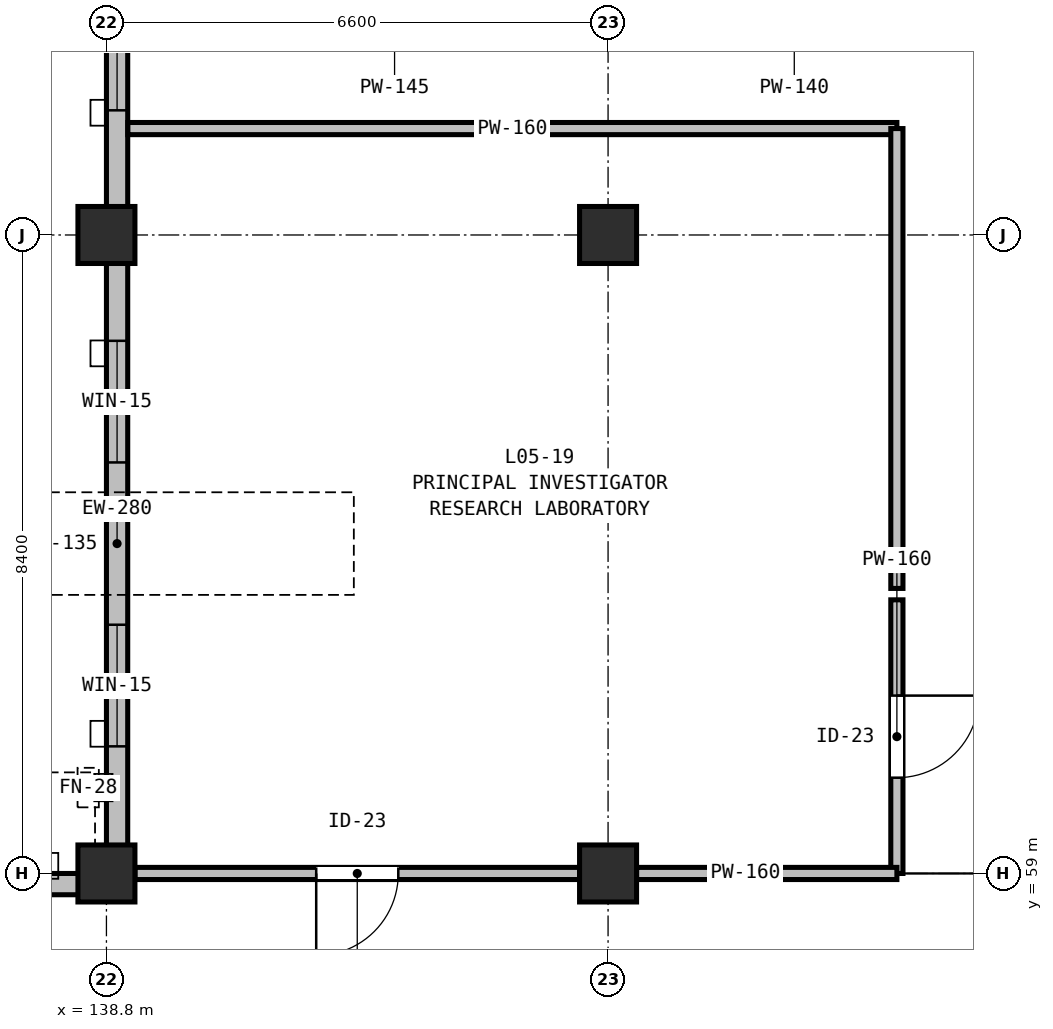
"""IFC4 building model, lengths in metres.
Left out: names, types, materials, properties, quantities, classifications, styles, units other than length and angle.
Written with IfcOpenShell. Run it as: python <this file> out.ifc"""

import sys

from ifc_helpers import new_model, si_unit, direction, frame, frame_2d, origin, origin_2d, place, context, subcontext, project, spatial, rectangle, extrude, element, fill, save


model = new_model("IFC4")
c1 = context("Model", 3, precision=1e-05, world=origin(), true_north=direction((0.0, 1.0)))
c2 = subcontext(c1, "Body", "Model", "MODEL_VIEW")
j1 = project(units=[si_unit("LENGTHUNIT", "METRE"), si_unit("PLANEANGLEUNIT", "RADIAN")], contexts=[c1])
p1 = place(None, origin())
s1 = spatial("IfcSite", under=j1, at=p1, CompositionType="ELEMENT")
p2 = place(p1, origin())
s2 = spatial("IfcBuilding", under=s1, at=p2, CompositionType="ELEMENT")
p3 = place(p2, frame((0.0, 0.0, 24.0)))
s3 = spatial("IfcBuildingStorey", under=s2, at=p3, CompositionType="ELEMENT", Elevation=24.0)
for number, where, z_axis, x_axis in (
    (1, (138.8, 59.0, 0.0), (0.0, 0.0, 1.0), (1.0, 0.0, 0.0)),
    (2, (138.8, 67.4, 0.0), (0.0, 0.0, 1.0), (1.0, 0.0, 0.0)),
    (3, (145.4, 59.0, 0.0), (0.0, 0.0, 1.0), (1.0, 0.0, 0.0)),
    (4, (145.4, 67.4, 0.0), (0.0, 0.0, 1.0), (1.0, 0.0, 0.0)),
):
    element("IfcColumn", number, at=place(p3, frame(where, z_axis=z_axis, x_axis=x_axis)), inside=s3, PredefinedType="COLUMN", context=c2, shape_type="SweptSolid", body=[
        extrude(rectangle(XDim=0.75, YDim=0.75, at=origin_2d()), origin(), (0.0, 0.0, 1.0), 4.5),
    ])
p4 = place(p3, frame((135.2, 58.86, 0.0), z_axis=(0.0, 0.0, 1.0), x_axis=(1.0, 0.0, 0.0)))
e5 = element("IfcWall", 5, at=p4, inside=s3, PredefinedType="STANDARD", context=c2, shape_type="SweptSolid", body=[
    extrude(rectangle(XDim=3.6, YDim=0.28, at=frame_2d((1.8, 0.0))), origin(), (0.0, 0.0, 1.0), 3.735),
])
p5 = place(p4, frame((1.1, 0.0, 0.9)))
e6 = element("IfcOpeningElement", 6, at=p5, cuts=e5, PredefinedType="OPENING", context=c2, shape_type="SweptSolid", body=[
    extrude(rectangle(XDim=1.4, YDim=1.55, at=frame_2d((0.7, 0.775))), frame((0.0, 0.15, 0.0), z_axis=(0.0, -1.0, 0.0), x_axis=(1.0, 0.0, 0.0)), (0.0, 0.0, 1.0), 0.3),
])
p6 = place(p3, frame((138.94, 59.28, 0.0), z_axis=(0.0, 0.0, 1.0), x_axis=(0.0, 1.0, 0.0)))
e7 = element("IfcWall", 7, at=p6, inside=s3, PredefinedType="STANDARD", context=c2, shape_type="SweptSolid", body=[
    extrude(rectangle(XDim=8.12, YDim=0.28, at=frame_2d((4.06, 0.0))), origin(), (0.0, 0.0, 1.0), 3.885),
])
p7 = place(p6, frame((1.392, 0.0, 0.9)))
e8 = element("IfcOpeningElement", 8, at=p7, cuts=e7, PredefinedType="OPENING", context=c2, shape_type="SweptSolid", body=[
    extrude(rectangle(XDim=1.6, YDim=1.6, at=frame_2d((0.8, 0.8))), frame((0.0, 0.15, 0.0), z_axis=(0.0, -1.0, 0.0), x_axis=(1.0, 0.0, 0.0)), (0.0, 0.0, 1.0), 0.3),
])
p8 = place(p6, frame((5.128, 0.0, 0.9)))
e9 = element("IfcOpeningElement", 9, at=p8, cuts=e7, PredefinedType="OPENING", context=c2, shape_type="SweptSolid", body=[
    extrude(rectangle(XDim=1.6, YDim=1.6, at=frame_2d((0.8, 0.8))), frame((0.0, 0.15, 0.0), z_axis=(0.0, -1.0, 0.0), x_axis=(1.0, 0.0, 0.0)), (0.0, 0.0, 1.0), 0.3),
])
p9 = place(p3, frame((138.94, 67.4, 0.0), z_axis=(0.0, 0.0, 1.0), x_axis=(0.0, 1.0, 0.0)))
e10 = element("IfcWall", 10, at=p9, inside=s3, PredefinedType="STANDARD", context=c2, shape_type="SweptSolid", body=[
    extrude(rectangle(XDim=8.4, YDim=0.28, at=frame_2d((4.2, 0.0))), origin(), (0.0, 0.0, 1.0), 3.885),
])
p10 = place(p9, frame((1.64, 0.0, 0.9)))
e11 = element("IfcOpeningElement", 11, at=p10, cuts=e10, PredefinedType="OPENING", context=c2, shape_type="SweptSolid", body=[
    extrude(rectangle(XDim=1.85, YDim=1.6, at=frame_2d((0.925, 0.8))), frame((0.0, 0.15, 0.0), z_axis=(0.0, -1.0, 0.0), x_axis=(1.0, 0.0, 0.0)), (0.0, 0.0, 1.0), 0.3),
])
p11 = place(p9, frame((5.207, 0.0, 0.9)))
e12 = element("IfcOpeningElement", 12, at=p11, cuts=e10, PredefinedType="OPENING", context=c2, shape_type="SweptSolid", body=[
    extrude(rectangle(XDim=1.85, YDim=1.6, at=frame_2d((0.925, 0.8))), frame((0.0, 0.15, 0.0), z_axis=(0.0, -1.0, 0.0), x_axis=(1.0, 0.0, 0.0)), (0.0, 0.0, 1.0), 0.3),
])
p12 = place(p3, frame((149.2, 62.6, 0.0), z_axis=(0.0, 0.0, 1.0), x_axis=(0.0, -1.0, 0.0)))
e13 = element("IfcWall", 13, at=p12, inside=s3, PredefinedType="PARTITIONING", context=c2, shape_type="SweptSolid", body=[
    extrude(rectangle(XDim=3.6, YDim=0.16, at=frame_2d((1.8, 0.0))), origin(), (0.0, 0.0, 1.0), 3.885),
])
p13 = place(p12, frame((1.26, 0.0, 0.0)))
e14 = element("IfcOpeningElement", 14, at=p13, cuts=e13, PredefinedType="OPENING", context=c2, shape_type="SweptSolid", body=[
    extrude(rectangle(XDim=1.08, YDim=2.14, at=frame_2d((0.54, 1.07))), frame((0.0, 0.09, 0.0), z_axis=(0.0, -1.0, 0.0), x_axis=(1.0, 0.0, 0.0)), (0.0, 0.0, 1.0), 0.18),
])
p14 = place(p3, frame((149.2, 59.0, 0.0), z_axis=(0.0, 0.0, 1.0), x_axis=(-1.0, 0.0, 0.0)))
e15 = element("IfcWall", 15, at=p14, inside=s3, PredefinedType="PARTITIONING", context=c2, shape_type="SweptSolid", body=[
    extrude(rectangle(XDim=3.425, YDim=0.16, at=frame_2d((1.712, 0.0))), origin(), (0.0, 0.0, 1.0), 3.885),
])
p15 = place(p3, frame((145.025, 59.0, 0.0), z_axis=(0.0, 0.0, 1.0), x_axis=(-1.0, 0.0, 0.0)))
e16 = element("IfcWall", 16, at=p15, inside=s3, PredefinedType="PARTITIONING", context=c2, shape_type="SweptSolid", body=[
    extrude(rectangle(XDim=5.85, YDim=0.16, at=frame_2d((2.925, 0.0))), origin(), (0.0, 0.0, 1.0), 3.885),
])
p16 = place(p15, frame((2.385, 0.0, 0.0)))
e17 = element("IfcOpeningElement", 17, at=p16, cuts=e16, PredefinedType="OPENING", context=c2, shape_type="SweptSolid", body=[
    extrude(rectangle(XDim=1.08, YDim=2.14, at=frame_2d((0.54, 1.07))), frame((0.0, 0.09, 0.0), z_axis=(0.0, -1.0, 0.0), x_axis=(1.0, 0.0, 0.0)), (0.0, 0.0, 1.0), 0.18),
])
p17 = place(p3, frame((139.082, 68.8, 0.0), z_axis=(0.0, 0.0, 1.0), x_axis=(1.0, 0.0, 0.0)))
e18 = element("IfcWall", 18, at=p17, inside=s3, PredefinedType="PARTITIONING", context=c2, shape_type="SweptSolid", body=[
    extrude(rectangle(XDim=10.118, YDim=0.16, at=frame_2d((5.059, 0.0))), origin(), (0.0, 0.0, 1.0), 3.735),
])
p18 = place(p3, frame((149.2, 68.8, 0.0), z_axis=(0.0, 0.0, 1.0), x_axis=(0.0, -1.0, 0.0)))
e19 = element("IfcWall", 19, at=p18, inside=s3, PredefinedType="PARTITIONING", context=c2, shape_type="SweptSolid", body=[
    extrude(rectangle(XDim=6.05, YDim=0.16, at=frame_2d((3.025, 0.0))), origin(), (0.0, 0.0, 1.0), 3.885),
])
p19 = place(p7, origin())
e20 = element("IfcWindow", 20, at=p19, inside=s3, PartitioningType="SINGLE_PANEL", PredefinedType="WINDOW", context=c2, shape_type="SweptSolid", body=[
    extrude(rectangle(XDim=1.6, YDim=1.6, at=frame_2d((0.8, 0.8))), frame((0.0, 0.03, 0.0), z_axis=(0.0, -1.0, 0.0), x_axis=(1.0, 0.0, 0.0)), (0.0, 0.0, 1.0), 0.06),
])
fill(e8, e20)
p20 = place(p8, origin())
e21 = element("IfcWindow", 21, at=p20, inside=s3, PartitioningType="SINGLE_PANEL", PredefinedType="WINDOW", context=c2, shape_type="SweptSolid", body=[
    extrude(rectangle(XDim=1.6, YDim=1.6, at=frame_2d((0.8, 0.8))), frame((0.0, 0.03, 0.0), z_axis=(0.0, -1.0, 0.0), x_axis=(1.0, 0.0, 0.0)), (0.0, 0.0, 1.0), 0.06),
])
fill(e9, e21)
p21 = place(p10, origin())
e22 = element("IfcWindow", 22, at=p21, inside=s3, PartitioningType="SINGLE_PANEL", PredefinedType="WINDOW", context=c2, shape_type="SweptSolid", body=[
    extrude(rectangle(XDim=1.85, YDim=1.6, at=frame_2d((0.925, 0.8))), frame((0.0, 0.03, 0.0), z_axis=(0.0, -1.0, 0.0), x_axis=(1.0, 0.0, 0.0)), (0.0, 0.0, 1.0), 0.06),
])
fill(e11, e22)
p22 = place(p16, origin())
e23 = element("IfcDoor", 23, at=p22, inside=s3, OperationType="SINGLE_SWING_RIGHT", PredefinedType="DOOR", context=c2, shape_type="SweptSolid", body=[
    extrude(rectangle(XDim=1.08, YDim=2.14, at=frame_2d((0.54, 1.07))), frame((0.0, 0.025, 0.0), z_axis=(0.0, -1.0, 0.0), x_axis=(1.0, 0.0, 0.0)), (0.0, 0.0, 1.0), 0.05),
])
fill(e17, e23)
p23 = place(p13, origin())
e24 = element("IfcDoor", 24, at=p23, inside=s3, OperationType="SINGLE_SWING_LEFT", PredefinedType="DOOR", context=c2, shape_type="SweptSolid", body=[
    extrude(rectangle(XDim=1.08, YDim=2.14, at=frame_2d((0.54, 1.07))), frame((0.0, 0.025, 0.0), z_axis=(0.0, -1.0, 0.0), x_axis=(1.0, 0.0, 0.0)), (0.0, 0.0, 1.0), 0.05),
])
fill(e14, e24)
save(model, sys.argv[1])
